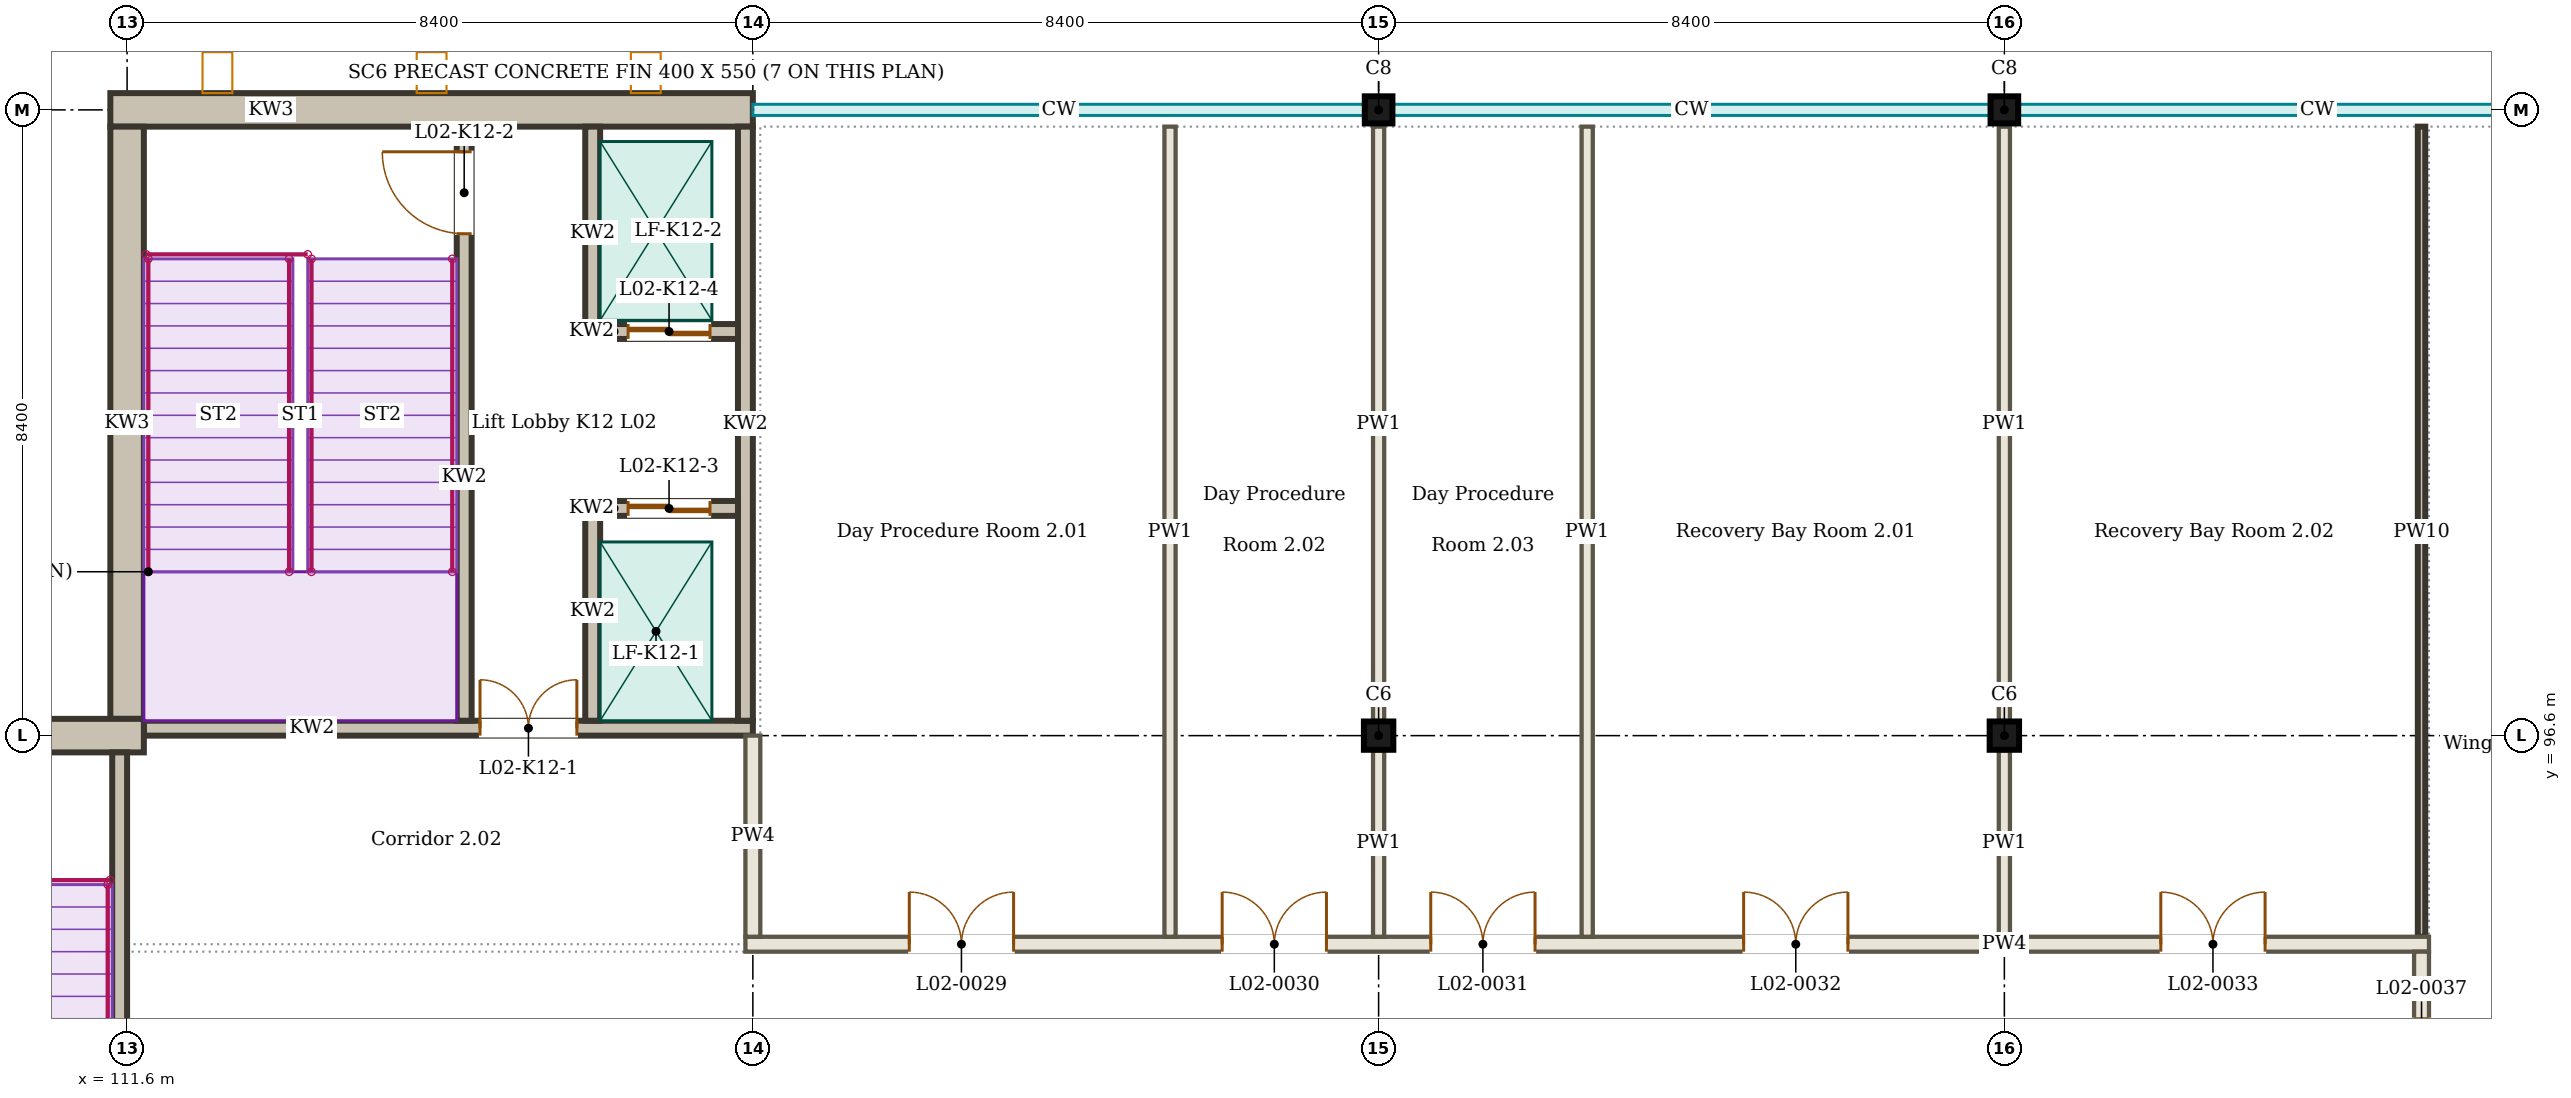
"""IFC4 building model, lengths in metres.
Left out: names, types, materials, properties, quantities, classifications, styles, units other than length and angle.
Written with IfcOpenShell. Run it as: python <this file> out.ifc"""

import sys

from ifc_helpers import new_model, si_unit, direction, frame, frame_2d, origin, origin_2d, place, context, subcontext, project, spatial, rectangle, i_section, extrude, element, fill, save


model = new_model("IFC4")
c1 = context("Model", 3, precision=1e-05, world=origin(), true_north=direction((0.0, 1.0)))
c2 = subcontext(c1, "Body", "Model", "MODEL_VIEW")
j1 = project(units=[si_unit("LENGTHUNIT", "METRE"), si_unit("PLANEANGLEUNIT", "RADIAN")], contexts=[c1])
p1 = place(None, origin())
s1 = spatial("IfcSite", under=j1, at=p1, CompositionType="ELEMENT")
p2 = place(p1, origin())
s2 = spatial("IfcBuilding", under=s1, at=p2, CompositionType="ELEMENT")
p3 = place(p2, frame((0.0, 0.0, 9.0)))
s3 = spatial("IfcBuildingStorey", under=s2, at=p3, CompositionType="ELEMENT", Elevation=9.0)
for number, where, z_axis, x_axis in (
    (1, (128.4, 96.6, 0.0), (0.0, 0.0, 1.0), (1.0, 0.0, 0.0)),
    (2, (136.8, 96.6, 0.0), (0.0, 0.0, 1.0), (1.0, 0.0, 0.0)),
):
    element("IfcColumn", number, at=place(p3, frame(where, z_axis=z_axis, x_axis=x_axis)), inside=s3, PredefinedType="COLUMN", context=c2, shape_type="SweptSolid", body=[
        extrude(i_section(OverallWidth=0.395, OverallDepth=0.38, WebThickness=0.019, FlangeThickness=0.03, FilletRadius=0.027, at=origin_2d()), origin(), (0.0, 0.0, 1.0), 4.5),
    ])
for number, where, z_axis, x_axis in (
    (3, (128.4, 105.0, 0.0), (0.0, 0.0, 1.0), (1.0, 0.0, 0.0)),
    (4, (136.8, 105.0, 0.0), (0.0, 0.0, 1.0), (1.0, 0.0, 0.0)),
):
    element("IfcColumn", number, at=place(p3, frame(where, z_axis=z_axis, x_axis=x_axis)), inside=s3, PredefinedType="COLUMN", context=c2, shape_type="SweptSolid", body=[
        extrude(i_section(OverallWidth=0.371, OverallDepth=0.364, WebThickness=0.013, FlangeThickness=0.022, FilletRadius=0.027, at=origin_2d()), origin(), (0.0, 0.0, 1.0), 4.5),
    ])
p4 = place(p3, frame((136.8, 105.16, 3.87), z_axis=(0.0, 0.0, 1.0), x_axis=(1.0, 0.0, 0.0)))
e5 = element("IfcWall", 5, at=p4, inside=s3, PredefinedType="SOLIDWALL", context=c2, shape_type="SweptSolid", body=[
    extrude(rectangle(XDim=8.4, YDim=0.13, at=frame_2d((4.2, 0.0))), origin(), (0.0, 0.0, 1.0), 0.63),
])
p5 = place(p3, frame((119.9, 93.8, 0.0), z_axis=(0.0, 0.0, 1.0), x_axis=(1.0, 0.0, 0.0)))
e6 = element("IfcWall", 6, at=p5, inside=s3, PredefinedType="PARTITIONING", context=c2, shape_type="SweptSolid", body=[
    extrude(rectangle(XDim=22.6, YDim=0.2, at=frame_2d((11.3, 0.0))), origin(), (0.0, 0.0, 1.0), 3.8),
])
p6 = place(p5, frame((2.2, 0.0, 0.0)))
e7 = element("IfcOpeningElement", 7, at=p6, cuts=e6, PredefinedType="OPENING", context=c2, shape_type="SweptSolid", body=[
    extrude(rectangle(XDim=1.4, YDim=2.1, at=frame_2d((0.7, 1.05))), frame((0.0, 0.11, 0.0), z_axis=(0.0, -1.0, 0.0), x_axis=(1.0, 0.0, 0.0)), (0.0, 0.0, 1.0), 0.22),
])
p7 = place(p5, frame((6.4, 0.0, 0.0)))
e8 = element("IfcOpeningElement", 8, at=p7, cuts=e6, PredefinedType="OPENING", context=c2, shape_type="SweptSolid", body=[
    extrude(rectangle(XDim=1.4, YDim=2.1, at=frame_2d((0.7, 1.05))), frame((0.0, 0.11, 0.0), z_axis=(0.0, -1.0, 0.0), x_axis=(1.0, 0.0, 0.0)), (0.0, 0.0, 1.0), 0.22),
])
p8 = place(p5, frame((9.2, 0.0, 0.0)))
e9 = element("IfcOpeningElement", 9, at=p8, cuts=e6, PredefinedType="OPENING", context=c2, shape_type="SweptSolid", body=[
    extrude(rectangle(XDim=1.4, YDim=2.1, at=frame_2d((0.7, 1.05))), frame((0.0, 0.11, 0.0), z_axis=(0.0, -1.0, 0.0), x_axis=(1.0, 0.0, 0.0)), (0.0, 0.0, 1.0), 0.22),
])
p9 = place(p5, frame((13.4, 0.0, 0.0)))
e10 = element("IfcOpeningElement", 10, at=p9, cuts=e6, PredefinedType="OPENING", context=c2, shape_type="SweptSolid", body=[
    extrude(rectangle(XDim=1.4, YDim=2.1, at=frame_2d((0.7, 1.05))), frame((0.0, 0.11, 0.0), z_axis=(0.0, -1.0, 0.0), x_axis=(1.0, 0.0, 0.0)), (0.0, 0.0, 1.0), 0.22),
])
p10 = place(p5, frame((19.0, 0.0, 0.0)))
e11 = element("IfcOpeningElement", 11, at=p10, cuts=e6, PredefinedType="OPENING", context=c2, shape_type="SweptSolid", body=[
    extrude(rectangle(XDim=1.4, YDim=2.1, at=frame_2d((0.7, 1.05))), frame((0.0, 0.11, 0.0), z_axis=(0.0, -1.0, 0.0), x_axis=(1.0, 0.0, 0.0)), (0.0, 0.0, 1.0), 0.22),
])
p11 = place(p3, frame((120.0, 93.9, 0.0), z_axis=(0.0, 0.0, 1.0), x_axis=(0.0, 1.0, 0.0)))
e12 = element("IfcWall", 12, at=p11, inside=s3, PredefinedType="PARTITIONING", context=c2, shape_type="SweptSolid", body=[
    extrude(rectangle(XDim=2.7, YDim=0.2, at=frame_2d((1.35, 0.0))), origin(), (0.0, 0.0, 1.0), 3.8),
])
p12 = place(p3, frame((125.6, 93.9, 0.0), z_axis=(0.0, 0.0, 1.0), x_axis=(0.0, 1.0, 0.0)))
e13 = element("IfcWall", 13, at=p12, inside=s3, PredefinedType="PARTITIONING", context=c2, shape_type="SweptSolid", body=[
    extrude(rectangle(XDim=10.875, YDim=0.15, at=frame_2d((5.438, 0.0))), origin(), (0.0, 0.0, 1.0), 3.8),
])
p13 = place(p3, frame((128.4, 93.9, 0.0), z_axis=(0.0, 0.0, 1.0), x_axis=(0.0, 1.0, 0.0)))
e14 = element("IfcWall", 14, at=p13, inside=s3, PredefinedType="PARTITIONING", context=c2, shape_type="SweptSolid", body=[
    extrude(rectangle(XDim=2.503, YDim=0.15, at=frame_2d((1.251, 0.0))), origin(), (0.0, 0.0, 1.0), 3.8),
])
p14 = place(p3, frame((128.4, 96.798, 0.0), z_axis=(0.0, 0.0, 1.0), x_axis=(0.0, 1.0, 0.0)))
e15 = element("IfcWall", 15, at=p14, inside=s3, PredefinedType="PARTITIONING", context=c2, shape_type="SweptSolid", body=[
    extrude(rectangle(XDim=7.977, YDim=0.15, at=frame_2d((3.989, 0.0))), origin(), (0.0, 0.0, 1.0), 3.8),
])
p15 = place(p3, frame((131.2, 93.9, 0.0), z_axis=(0.0, 0.0, 1.0), x_axis=(0.0, 1.0, 0.0)))
e16 = element("IfcWall", 16, at=p15, inside=s3, PredefinedType="PARTITIONING", context=c2, shape_type="SweptSolid", body=[
    extrude(rectangle(XDim=10.875, YDim=0.15, at=frame_2d((5.438, 0.0))), origin(), (0.0, 0.0, 1.0), 3.8),
])
p16 = place(p3, frame((136.8, 93.9, 0.0), z_axis=(0.0, 0.0, 1.0), x_axis=(0.0, 1.0, 0.0)))
e17 = element("IfcWall", 17, at=p16, inside=s3, PredefinedType="PARTITIONING", context=c2, shape_type="SweptSolid", body=[
    extrude(rectangle(XDim=2.503, YDim=0.15, at=frame_2d((1.251, 0.0))), origin(), (0.0, 0.0, 1.0), 3.8),
])
p17 = place(p3, frame((136.8, 96.798, 0.0), z_axis=(0.0, 0.0, 1.0), x_axis=(0.0, 1.0, 0.0)))
e18 = element("IfcWall", 18, at=p17, inside=s3, PredefinedType="PARTITIONING", context=c2, shape_type="SweptSolid", body=[
    extrude(rectangle(XDim=7.977, YDim=0.15, at=frame_2d((3.989, 0.0))), origin(), (0.0, 0.0, 1.0), 3.8),
])
p18 = place(p3, frame((142.4, 91.1, 0.0), z_axis=(0.0, 0.0, 1.0), x_axis=(0.0, 1.0, 0.0)))
e19 = element("IfcWall", 19, at=p18, inside=s3, PredefinedType="PARTITIONING", context=c2, shape_type="SweptSolid", body=[
    extrude(rectangle(XDim=2.6, YDim=0.2, at=frame_2d((1.3, 0.0))), origin(), (0.0, 0.0, 1.0), 3.95),
])
p19 = place(p18, frame((0.9, 0.0, 0.0)))
e20 = element("IfcOpeningElement", 20, at=p19, cuts=e19, PredefinedType="OPENING", context=c2, shape_type="SweptSolid", body=[
    extrude(rectangle(XDim=0.8, YDim=2.1, at=frame_2d((0.4, 1.05))), frame((0.0, 0.11, 0.0), z_axis=(0.0, -1.0, 0.0), x_axis=(1.0, 0.0, 0.0)), (0.0, 0.0, 1.0), 0.22),
])
p20 = place(p3, frame((142.4, 93.9, 0.0), z_axis=(0.0, 0.0, 1.0), x_axis=(0.0, 1.0, 0.0)))
e21 = element("IfcWall", 21, at=p20, inside=s3, PredefinedType="SOLIDWALL", context=c2, shape_type="SweptSolid", body=[
    extrude(rectangle(XDim=10.875, YDim=0.1, at=frame_2d((5.438, 0.0))), origin(), (0.0, 0.0, 1.0), 3.8),
])
p21 = place(p3, frame((111.825, 96.6, 0.0), z_axis=(0.0, 0.0, 1.0), x_axis=(-1.0, 0.0, 0.0)))
e22 = element("IfcWall", 22, at=p21, inside=s3, PredefinedType="SOLIDWALL", context=c2, shape_type="SweptSolid", body=[
    extrude(rectangle(XDim=8.625, YDim=0.45, at=frame_2d((4.312, 0.0))), origin(), (0.0, 0.0, 1.0), 4.5),
])
p22 = place(p3, frame((111.5, 88.4, 0.0), z_axis=(0.0, 0.0, 1.0), x_axis=(0.0, 1.0, 0.0)))
e23 = element("IfcWall", 23, at=p22, inside=s3, PredefinedType="SOLIDWALL", context=c2, shape_type="SweptSolid", body=[
    extrude(rectangle(XDim=7.975, YDim=0.2, at=frame_2d((3.988, 0.0))), origin(), (0.0, 0.0, 1.0), 4.5),
])
p23 = place(p3, frame((111.825, 96.7, 0.0), z_axis=(0.0, 0.0, 1.0), x_axis=(1.0, 0.0, 0.0)))
e24 = element("IfcWall", 24, at=p23, inside=s3, PredefinedType="SOLIDWALL", context=c2, shape_type="SweptSolid", body=[
    extrude(rectangle(XDim=8.175, YDim=0.2, at=frame_2d((4.087, 0.0))), origin(), (0.0, 0.0, 1.0), 4.5),
])
p24 = place(p23, frame((4.512, 0.0, 0.0)))
e25 = element("IfcOpeningElement", 25, at=p24, cuts=e24, PredefinedType="OPENING", context=c2, shape_type="SweptSolid", body=[
    extrude(rectangle(XDim=1.3, YDim=2.1, at=frame_2d((0.65, 1.05))), frame((0.0, 0.11, 0.0), z_axis=(0.0, -1.0, 0.0), x_axis=(1.0, 0.0, 0.0)), (0.0, 0.0, 1.0), 0.22),
])
p25 = place(p3, frame((111.375, 105.0, 0.0), z_axis=(0.0, 0.0, 1.0), x_axis=(1.0, 0.0, 0.0)))
e26 = element("IfcWall", 26, at=p25, inside=s3, PredefinedType="SOLIDWALL", context=c2, shape_type="SweptSolid", body=[
    extrude(rectangle(XDim=8.625, YDim=0.45, at=frame_2d((4.312, 0.0))), origin(), (0.0, 0.0, 1.0), 4.5),
])
p26 = place(p3, frame((111.6, 96.825, 0.0), z_axis=(0.0, 0.0, 1.0), x_axis=(0.0, 1.0, 0.0)))
e27 = element("IfcWall", 27, at=p26, inside=s3, PredefinedType="SOLIDWALL", context=c2, shape_type="SweptSolid", body=[
    extrude(rectangle(XDim=7.95, YDim=0.45, at=frame_2d((3.975, 0.0))), origin(), (0.0, 0.0, 1.0), 4.5),
])
p27 = place(p3, frame((119.9, 96.8, 0.0), z_axis=(0.0, 0.0, 1.0), x_axis=(0.0, 1.0, 0.0)))
e28 = element("IfcWall", 28, at=p27, inside=s3, PredefinedType="SOLIDWALL", context=c2, shape_type="SweptSolid", body=[
    extrude(rectangle(XDim=7.975, YDim=0.2, at=frame_2d((3.987, 0.0))), origin(), (0.0, 0.0, 1.0), 4.5),
])
p28 = place(p3, frame((116.125, 96.8, 0.0), z_axis=(0.0, 0.0, 1.0), x_axis=(0.0, 1.0, 0.0)))
e29 = element("IfcWall", 29, at=p28, inside=s3, PredefinedType="SOLIDWALL", context=c2, shape_type="SweptSolid", body=[
    extrude(rectangle(XDim=7.975, YDim=0.2, at=frame_2d((3.987, 0.0))), origin(), (0.0, 0.0, 1.0), 4.5),
])
p29 = place(p28, frame((6.538, 0.0, 0.0)))
e30 = element("IfcOpeningElement", 30, at=p29, cuts=e29, PredefinedType="OPENING", context=c2, shape_type="SweptSolid", body=[
    extrude(rectangle(XDim=1.1, YDim=2.1, at=frame_2d((0.55, 1.05))), frame((0.0, 0.11, 0.0), z_axis=(0.0, -1.0, 0.0), x_axis=(1.0, 0.0, 0.0)), (0.0, 0.0, 1.0), 0.22),
])
p30 = place(p3, frame((117.85, 96.8, 0.0), z_axis=(0.0, 0.0, 1.0), x_axis=(0.0, 1.0, 0.0)))
e31 = element("IfcWall", 31, at=p30, inside=s3, PredefinedType="SOLIDWALL", context=c2, shape_type="SweptSolid", body=[
    extrude(rectangle(XDim=2.95, YDim=0.2, at=frame_2d((1.475, 0.0))), origin(), (0.0, 0.0, 1.0), 4.5),
])
p31 = place(p3, frame((117.85, 101.925, 0.0), z_axis=(0.0, 0.0, 1.0), x_axis=(0.0, 1.0, 0.0)))
e32 = element("IfcWall", 32, at=p31, inside=s3, PredefinedType="SOLIDWALL", context=c2, shape_type="SweptSolid", body=[
    extrude(rectangle(XDim=2.85, YDim=0.2, at=frame_2d((1.425, 0.0))), origin(), (0.0, 0.0, 1.0), 4.5),
])
p32 = place(p3, frame((117.95, 99.65, 0.0), z_axis=(0.0, 0.0, 1.0), x_axis=(1.0, 0.0, 0.0)))
e33 = element("IfcWall", 33, at=p32, inside=s3, PredefinedType="SOLIDWALL", context=c2, shape_type="SweptSolid", body=[
    extrude(rectangle(XDim=1.85, YDim=0.2, at=frame_2d((0.925, 0.0))), origin(), (0.0, 0.0, 1.0), 4.5),
])
p33 = place(p32, frame((0.375, 0.0, 0.0)))
e34 = element("IfcOpeningElement", 34, at=p33, cuts=e33, PredefinedType="OPENING", context=c2, shape_type="SweptSolid", body=[
    extrude(rectangle(XDim=1.1, YDim=2.1, at=frame_2d((0.55, 1.05))), frame((0.0, 0.11, 0.0), z_axis=(0.0, -1.0, 0.0), x_axis=(1.0, 0.0, 0.0)), (0.0, 0.0, 1.0), 0.22),
])
p34 = place(p3, frame((117.95, 102.025, 0.0), z_axis=(0.0, 0.0, 1.0), x_axis=(1.0, 0.0, 0.0)))
e35 = element("IfcWall", 35, at=p34, inside=s3, PredefinedType="SOLIDWALL", context=c2, shape_type="SweptSolid", body=[
    extrude(rectangle(XDim=1.85, YDim=0.2, at=frame_2d((0.925, 0.0))), origin(), (0.0, 0.0, 1.0), 4.5),
])
p35 = place(p34, frame((0.375, 0.0, 0.0)))
e36 = element("IfcOpeningElement", 36, at=p35, cuts=e35, PredefinedType="OPENING", context=c2, shape_type="SweptSolid", body=[
    extrude(rectangle(XDim=1.1, YDim=2.1, at=frame_2d((0.55, 1.05))), frame((0.0, 0.11, 0.0), z_axis=(0.0, -1.0, 0.0), x_axis=(1.0, 0.0, 0.0)), (0.0, 0.0, 1.0), 0.22),
])
p36 = place(p6, origin())
e37 = element("IfcDoor", 37, at=p36, inside=s3, OperationType="DOUBLE_DOOR_SINGLE_SWING", PredefinedType="DOOR", context=c2, shape_type="SweptSolid", body=[
    extrude(rectangle(XDim=1.4, YDim=2.1, at=frame_2d((0.7, 1.05))), frame((0.0, 0.025, 0.0), z_axis=(0.0, -1.0, 0.0), x_axis=(1.0, 0.0, 0.0)), (0.0, 0.0, 1.0), 0.05),
])
fill(e7, e37)
p37 = place(p7, origin())
e38 = element("IfcDoor", 38, at=p37, inside=s3, OperationType="DOUBLE_DOOR_SINGLE_SWING", PredefinedType="DOOR", context=c2, shape_type="SweptSolid", body=[
    extrude(rectangle(XDim=1.4, YDim=2.1, at=frame_2d((0.7, 1.05))), frame((0.0, 0.025, 0.0), z_axis=(0.0, -1.0, 0.0), x_axis=(1.0, 0.0, 0.0)), (0.0, 0.0, 1.0), 0.05),
])
fill(e8, e38)
p38 = place(p8, origin())
e39 = element("IfcDoor", 39, at=p38, inside=s3, OperationType="DOUBLE_DOOR_SINGLE_SWING", PredefinedType="DOOR", context=c2, shape_type="SweptSolid", body=[
    extrude(rectangle(XDim=1.4, YDim=2.1, at=frame_2d((0.7, 1.05))), frame((0.0, 0.025, 0.0), z_axis=(0.0, -1.0, 0.0), x_axis=(1.0, 0.0, 0.0)), (0.0, 0.0, 1.0), 0.05),
])
fill(e9, e39)
p39 = place(p9, origin())
e40 = element("IfcDoor", 40, at=p39, inside=s3, OperationType="DOUBLE_DOOR_SINGLE_SWING", PredefinedType="DOOR", context=c2, shape_type="SweptSolid", body=[
    extrude(rectangle(XDim=1.4, YDim=2.1, at=frame_2d((0.7, 1.05))), frame((0.0, 0.025, 0.0), z_axis=(0.0, -1.0, 0.0), x_axis=(1.0, 0.0, 0.0)), (0.0, 0.0, 1.0), 0.05),
])
fill(e10, e40)
p40 = place(p10, origin())
e41 = element("IfcDoor", 41, at=p40, inside=s3, OperationType="DOUBLE_DOOR_SINGLE_SWING", PredefinedType="DOOR", context=c2, shape_type="SweptSolid", body=[
    extrude(rectangle(XDim=1.4, YDim=2.1, at=frame_2d((0.7, 1.05))), frame((0.0, 0.025, 0.0), z_axis=(0.0, -1.0, 0.0), x_axis=(1.0, 0.0, 0.0)), (0.0, 0.0, 1.0), 0.05),
])
fill(e11, e41)
p41 = place(p24, origin())
e42 = element("IfcDoor", 42, at=p41, inside=s3, OperationType="DOUBLE_DOOR_DOUBLE_SWING", PredefinedType="DOOR", context=c2, shape_type="SweptSolid", body=[
    extrude(rectangle(XDim=1.3, YDim=2.1, at=frame_2d((0.65, 1.05))), frame((0.0, 0.025, 0.0), z_axis=(0.0, -1.0, 0.0), x_axis=(1.0, 0.0, 0.0)), (0.0, 0.0, 1.0), 0.05),
])
fill(e25, e42)
p42 = place(p29, origin())
e43 = element("IfcDoor", 43, at=p42, inside=s3, OperationType="SINGLE_SWING_RIGHT", PredefinedType="DOOR", context=c2, shape_type="SweptSolid", body=[
    extrude(rectangle(XDim=1.1, YDim=2.1, at=frame_2d((0.55, 1.05))), frame((0.0, 0.025, 0.0), z_axis=(0.0, -1.0, 0.0), x_axis=(1.0, 0.0, 0.0)), (0.0, 0.0, 1.0), 0.05),
])
fill(e30, e43)
p43 = place(p33, origin())
e44 = element("IfcDoor", 44, at=p43, inside=s3, OperationType="DOUBLE_DOOR_SLIDING", PredefinedType="DOOR", context=c2, shape_type="SweptSolid", body=[
    extrude(rectangle(XDim=1.1, YDim=2.1, at=frame_2d((0.55, 1.05))), frame((0.0, 0.025, 0.0), z_axis=(0.0, -1.0, 0.0), x_axis=(1.0, 0.0, 0.0)), (0.0, 0.0, 1.0), 0.05),
])
fill(e34, e44)
p44 = place(p35, origin())
e45 = element("IfcDoor", 45, at=p44, inside=s3, OperationType="DOUBLE_DOOR_SLIDING", PredefinedType="DOOR", context=c2, shape_type="SweptSolid", body=[
    extrude(rectangle(XDim=1.1, YDim=2.1, at=frame_2d((0.55, 1.05))), frame((0.0, 0.025, 0.0), z_axis=(0.0, -1.0, 0.0), x_axis=(1.0, 0.0, 0.0)), (0.0, 0.0, 1.0), 0.05),
])
fill(e36, e45)
save(model, sys.argv[1])
